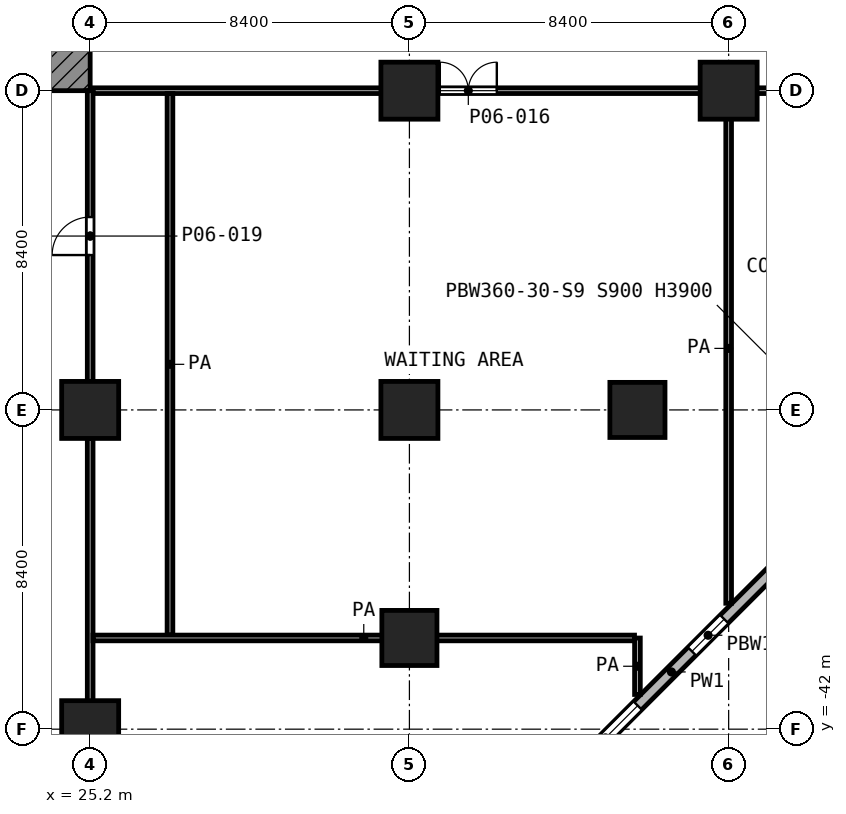
"""IFC4 building model, lengths in metres.
Left out: names, types, materials, properties, quantities, classifications, styles, units other than length and angle.
Written with IfcOpenShell. Run it as: python <this file> out.ifc"""

import sys

from ifc_helpers import new_model, si_unit, direction, frame, frame_2d, origin, origin_2d, place, context, subcontext, project, spatial, rectangle, extrude, element, fill, save


model = new_model("IFC4")
c1 = context("Model", 3, precision=1e-05, world=origin(), true_north=direction((0.0, 1.0)))
c2 = subcontext(c1, "Body", "Model", "MODEL_VIEW")
j1 = project(units=[si_unit("LENGTHUNIT", "METRE"), si_unit("PLANEANGLEUNIT", "RADIAN")], contexts=[c1])
p1 = place(None, origin())
s1 = spatial("IfcSite", under=j1, at=p1, CompositionType="ELEMENT")
p2 = place(p1, origin())
s2 = spatial("IfcBuilding", under=s1, at=p2, CompositionType="ELEMENT")
p3 = place(p2, frame((0.0, 0.0, 29.0)))
s3 = spatial("IfcBuildingStorey", under=s2, at=p3, CompositionType="ELEMENT", Elevation=29.0)
for number, where, z_axis, x_axis in (
    (1, (33.6, -25.2, 0.0), (0.0, 0.0, 1.0), (1.0, 0.0, 0.0)),
    (2, (42.0, -25.2, 0.0), (0.0, 0.0, 1.0), (1.0, 0.0, 0.0)),
    (3, (25.2, -33.6, 0.0), (0.0, 0.0, 1.0), (1.0, 0.0, 0.0)),
    (4, (33.6, -33.6, 0.0), (0.0, 0.0, 1.0), (1.0, 0.0, 0.0)),
):
    element("IfcColumn", number, at=place(p3, frame(where, z_axis=z_axis, x_axis=x_axis)), inside=s3, PredefinedType="COLUMN", context=c2, shape_type="SweptSolid", body=[
        extrude(rectangle(XDim=1.5, YDim=1.5, at=origin_2d()), origin(), (0.0, 0.0, 1.0), 5.2),
    ])
for number, where, z_axis, x_axis in (
    (5, (39.6, -33.6, 0.0), (0.0, 0.0, 1.0), (1.0, 0.0, 0.0)),
    (6, (33.6, -39.6, 0.0), (0.0, 0.0, 1.0), (1.0, 0.0, 0.0)),
):
    element("IfcColumn", number, at=place(p3, frame(where, z_axis=z_axis, x_axis=x_axis)), inside=s3, PredefinedType="COLUMN", context=c2, shape_type="SweptSolid", body=[
        extrude(rectangle(XDim=1.45, YDim=1.45, at=origin_2d()), origin(), (0.0, 0.0, 1.0), 5.2),
    ])
p4 = place(p3, frame((25.2, -42.0, 0.0), z_axis=(0.0, 0.0, 1.0), x_axis=(1.0, 0.0, 0.0)))
e7 = element("IfcColumn", 7, at=p4, inside=s3, PredefinedType="COLUMN", context=c2, shape_type="SweptSolid", body=[
    extrude(rectangle(XDim=1.5, YDim=1.5, at=origin_2d()), origin(), (0.0, 0.0, 1.0), 5.2),
])
p5 = place(p3, frame((37.45, -43.538, 0.0), z_axis=(0.0, 0.0, 1.0), x_axis=(0.707106781187, 0.707106781187, 0.0)))
e8 = element("IfcWall", 8, at=p5, inside=s3, PredefinedType="SOLIDWALL", context=c2, shape_type="SweptSolid", body=[
    extrude(rectangle(XDim=8.61, YDim=0.3, at=frame_2d((4.305, 0.0))), origin(), (0.0, 0.0, 1.0), 4.7),
])
p6 = place(p5, frame((0.651, 0.0, 0.9)))
e9 = element("IfcOpeningElement", 9, at=p6, cuts=e8, PredefinedType="OPENING", context=c2, shape_type="SweptSolid", body=[
    extrude(rectangle(XDim=2.4, YDim=3.0, at=frame_2d((1.2, 1.5))), frame((0.0, 0.16, 0.0), z_axis=(0.0, -1.0, 0.0), x_axis=(1.0, 0.0, 0.0)), (0.0, 0.0, 1.0), 0.32),
])
p7 = place(p5, frame((5.07, 0.0, 0.9)))
e10 = element("IfcOpeningElement", 10, at=p7, cuts=e8, PredefinedType="OPENING", context=c2, shape_type="SweptSolid", body=[
    extrude(rectangle(XDim=1.2, YDim=3.0, at=frame_2d((0.6, 1.5))), frame((0.0, 0.16, 0.0), z_axis=(0.0, -1.0, 0.0), x_axis=(1.0, 0.0, 0.0)), (0.0, 0.0, 1.0), 0.32),
])
p8 = place(p3, frame((24.6, -25.2, 0.0), z_axis=(0.0, 0.0, 1.0), x_axis=(0.0, 1.0, 0.0)))
e11 = element("IfcWall", 11, at=p8, inside=s3, PredefinedType="SHEAR", context=c2, shape_type="SweptSolid", body=[
    extrude(rectangle(XDim=1.2, YDim=1.2, at=frame_2d((0.6, 0.0))), origin(), (0.0, 0.0, 1.0), 4.7),
])
p9 = place(p3, frame((25.275, -39.6, 0.0), z_axis=(0.0, 0.0, 1.0), x_axis=(1.0, 0.0, 0.0)))
e12 = element("IfcWall", 12, at=p9, inside=s3, PredefinedType="PARTITIONING", context=c2, shape_type="SweptSolid", body=[
    extrude(rectangle(XDim=14.248, YDim=0.15, at=frame_2d((7.124, 0.0))), origin(), (0.0, 0.0, 1.0), 4.7),
])
p10 = place(p3, frame((25.275, -25.2, 0.0), z_axis=(0.0, 0.0, 1.0), x_axis=(1.0, 0.0, 0.0)))
e13 = element("IfcWall", 13, at=p10, inside=s3, PredefinedType="PARTITIONING", context=c2, shape_type="SweptSolid", body=[
    extrude(rectangle(XDim=70.805, YDim=0.15, at=frame_2d((35.403, 0.0))), origin(), (0.0, 0.0, 1.0), 4.7),
])
p11 = place(p10, frame((18.325, 0.0, 0.0)))
e14 = element("IfcOpeningElement", 14, at=p11, cuts=e13, PredefinedType="OPENING", context=c2, shape_type="SweptSolid", body=[
    extrude(rectangle(XDim=1.0, YDim=2.1, at=frame_2d((0.5, 1.05))), frame((0.0, 0.085, 0.0), z_axis=(0.0, -1.0, 0.0), x_axis=(1.0, 0.0, 0.0)), (0.0, 0.0, 1.0), 0.17),
])
p12 = place(p10, frame((22.525, 0.0, 0.0)))
e15 = element("IfcOpeningElement", 15, at=p12, cuts=e13, PredefinedType="OPENING", context=c2, shape_type="SweptSolid", body=[
    extrude(rectangle(XDim=1.0, YDim=2.1, at=frame_2d((0.5, 1.05))), frame((0.0, 0.085, 0.0), z_axis=(0.0, -1.0, 0.0), x_axis=(1.0, 0.0, 0.0)), (0.0, 0.0, 1.0), 0.17),
])
p13 = place(p10, frame((27.025, 0.0, 0.0)))
e16 = element("IfcOpeningElement", 16, at=p13, cuts=e13, PredefinedType="OPENING", context=c2, shape_type="SweptSolid", body=[
    extrude(rectangle(XDim=1.0, YDim=2.1, at=frame_2d((0.5, 1.05))), frame((0.0, 0.085, 0.0), z_axis=(0.0, -1.0, 0.0), x_axis=(1.0, 0.0, 0.0)), (0.0, 0.0, 1.0), 0.17),
])
p14 = place(p10, frame((31.225, 0.0, 0.0)))
e17 = element("IfcOpeningElement", 17, at=p14, cuts=e13, PredefinedType="OPENING", context=c2, shape_type="SweptSolid", body=[
    extrude(rectangle(XDim=1.0, YDim=2.1, at=frame_2d((0.5, 1.05))), frame((0.0, 0.085, 0.0), z_axis=(0.0, -1.0, 0.0), x_axis=(1.0, 0.0, 0.0)), (0.0, 0.0, 1.0), 0.17),
])
p15 = place(p10, frame((34.975, 0.0, 0.0)))
e18 = element("IfcOpeningElement", 18, at=p15, cuts=e13, PredefinedType="OPENING", context=c2, shape_type="SweptSolid", body=[
    extrude(rectangle(XDim=1.0, YDim=2.1, at=frame_2d((0.5, 1.05))), frame((0.0, 0.085, 0.0), z_axis=(0.0, -1.0, 0.0), x_axis=(1.0, 0.0, 0.0)), (0.0, 0.0, 1.0), 0.17),
])
p16 = place(p10, frame((39.175, 0.0, 0.0)))
e19 = element("IfcOpeningElement", 19, at=p16, cuts=e13, PredefinedType="OPENING", context=c2, shape_type="SweptSolid", body=[
    extrude(rectangle(XDim=1.0, YDim=2.1, at=frame_2d((0.5, 1.05))), frame((0.0, 0.085, 0.0), z_axis=(0.0, -1.0, 0.0), x_axis=(1.0, 0.0, 0.0)), (0.0, 0.0, 1.0), 0.17),
])
p17 = place(p10, frame((43.675, 0.0, 0.0)))
e20 = element("IfcOpeningElement", 20, at=p17, cuts=e13, PredefinedType="OPENING", context=c2, shape_type="SweptSolid", body=[
    extrude(rectangle(XDim=1.0, YDim=2.1, at=frame_2d((0.5, 1.05))), frame((0.0, 0.085, 0.0), z_axis=(0.0, -1.0, 0.0), x_axis=(1.0, 0.0, 0.0)), (0.0, 0.0, 1.0), 0.17),
])
p18 = place(p10, frame((47.875, 0.0, 0.0)))
e21 = element("IfcOpeningElement", 21, at=p18, cuts=e13, PredefinedType="OPENING", context=c2, shape_type="SweptSolid", body=[
    extrude(rectangle(XDim=1.0, YDim=2.1, at=frame_2d((0.5, 1.05))), frame((0.0, 0.085, 0.0), z_axis=(0.0, -1.0, 0.0), x_axis=(1.0, 0.0, 0.0)), (0.0, 0.0, 1.0), 0.17),
])
p19 = place(p10, frame((51.625, 0.0, 0.0)))
e22 = element("IfcOpeningElement", 22, at=p19, cuts=e13, PredefinedType="OPENING", context=c2, shape_type="SweptSolid", body=[
    extrude(rectangle(XDim=1.0, YDim=2.1, at=frame_2d((0.5, 1.05))), frame((0.0, 0.085, 0.0), z_axis=(0.0, -1.0, 0.0), x_axis=(1.0, 0.0, 0.0)), (0.0, 0.0, 1.0), 0.17),
])
p20 = place(p10, frame((55.825, 0.0, 0.0)))
e23 = element("IfcOpeningElement", 23, at=p20, cuts=e13, PredefinedType="OPENING", context=c2, shape_type="SweptSolid", body=[
    extrude(rectangle(XDim=1.0, YDim=2.1, at=frame_2d((0.5, 1.05))), frame((0.0, 0.085, 0.0), z_axis=(0.0, -1.0, 0.0), x_axis=(1.0, 0.0, 0.0)), (0.0, 0.0, 1.0), 0.17),
])
p21 = place(p10, frame((60.325, 0.0, 0.0)))
e24 = element("IfcOpeningElement", 24, at=p21, cuts=e13, PredefinedType="OPENING", context=c2, shape_type="SweptSolid", body=[
    extrude(rectangle(XDim=1.0, YDim=2.1, at=frame_2d((0.5, 1.05))), frame((0.0, 0.085, 0.0), z_axis=(0.0, -1.0, 0.0), x_axis=(1.0, 0.0, 0.0)), (0.0, 0.0, 1.0), 0.17),
])
p22 = place(p10, frame((66.525, 0.0, 0.0)))
e25 = element("IfcOpeningElement", 25, at=p22, cuts=e13, PredefinedType="OPENING", context=c2, shape_type="SweptSolid", body=[
    extrude(rectangle(XDim=1.0, YDim=2.1, at=frame_2d((0.5, 1.05))), frame((0.0, 0.085, 0.0), z_axis=(0.0, -1.0, 0.0), x_axis=(1.0, 0.0, 0.0)), (0.0, 0.0, 1.0), 0.17),
])
p23 = place(p10, frame((9.125, 0.0, 0.0)))
e26 = element("IfcOpeningElement", 26, at=p23, cuts=e13, PredefinedType="OPENING", context=c2, shape_type="SweptSolid", body=[
    extrude(rectangle(XDim=1.5, YDim=2.1, at=frame_2d((0.75, 1.05))), frame((0.0, 0.085, 0.0), z_axis=(0.0, -1.0, 0.0), x_axis=(1.0, 0.0, 0.0)), (0.0, 0.0, 1.0), 0.17),
])
p24 = place(p3, frame((25.2, -81.3, 0.0), z_axis=(0.0, 0.0, 1.0), x_axis=(0.0, 1.0, 0.0)))
e27 = element("IfcWall", 27, at=p24, inside=s3, PredefinedType="PARTITIONING", context=c2, shape_type="SweptSolid", body=[
    extrude(rectangle(XDim=46.95, YDim=0.15, at=frame_2d((23.475, 0.0))), origin(), (0.0, 0.0, 1.0), 4.7),
])
p25 = place(p24, frame((35.55, 0.0, 0.0)))
e28 = element("IfcOpeningElement", 28, at=p25, cuts=e27, PredefinedType="OPENING", context=c2, shape_type="SweptSolid", body=[
    extrude(rectangle(XDim=1.5, YDim=2.1, at=frame_2d((0.75, 1.05))), frame((0.0, 0.085, 0.0), z_axis=(0.0, -1.0, 0.0), x_axis=(1.0, 0.0, 0.0)), (0.0, 0.0, 1.0), 0.17),
])
p26 = place(p24, frame((28.0, 0.0, 0.0)))
e29 = element("IfcOpeningElement", 29, at=p26, cuts=e27, PredefinedType="OPENING", context=c2, shape_type="SweptSolid", body=[
    extrude(rectangle(XDim=1.0, YDim=2.1, at=frame_2d((0.5, 1.05))), frame((0.0, 0.085, 0.0), z_axis=(0.0, -1.0, 0.0), x_axis=(1.0, 0.0, 0.0)), (0.0, 0.0, 1.0), 0.17),
])
p27 = place(p24, frame((23.8, 0.0, 0.0)))
e30 = element("IfcOpeningElement", 30, at=p27, cuts=e27, PredefinedType="OPENING", context=c2, shape_type="SweptSolid", body=[
    extrude(rectangle(XDim=1.0, YDim=2.1, at=frame_2d((0.5, 1.05))), frame((0.0, 0.085, 0.0), z_axis=(0.0, -1.0, 0.0), x_axis=(1.0, 0.0, 0.0)), (0.0, 0.0, 1.0), 0.17),
])
p28 = place(p24, frame((20.05, 0.0, 0.0)))
e31 = element("IfcOpeningElement", 31, at=p28, cuts=e27, PredefinedType="OPENING", context=c2, shape_type="SweptSolid", body=[
    extrude(rectangle(XDim=1.0, YDim=2.1, at=frame_2d((0.5, 1.05))), frame((0.0, 0.085, 0.0), z_axis=(0.0, -1.0, 0.0), x_axis=(1.0, 0.0, 0.0)), (0.0, 0.0, 1.0), 0.17),
])
p29 = place(p24, frame((15.85, 0.0, 0.0)))
e32 = element("IfcOpeningElement", 32, at=p29, cuts=e27, PredefinedType="OPENING", context=c2, shape_type="SweptSolid", body=[
    extrude(rectangle(XDim=1.0, YDim=2.1, at=frame_2d((0.5, 1.05))), frame((0.0, 0.085, 0.0), z_axis=(0.0, -1.0, 0.0), x_axis=(1.0, 0.0, 0.0)), (0.0, 0.0, 1.0), 0.17),
])
p30 = place(p24, frame((11.35, 0.0, 0.0)))
e33 = element("IfcOpeningElement", 33, at=p30, cuts=e27, PredefinedType="OPENING", context=c2, shape_type="SweptSolid", body=[
    extrude(rectangle(XDim=1.0, YDim=2.1, at=frame_2d((0.5, 1.05))), frame((0.0, 0.085, 0.0), z_axis=(0.0, -1.0, 0.0), x_axis=(1.0, 0.0, 0.0)), (0.0, 0.0, 1.0), 0.17),
])
p31 = place(p24, frame((7.15, 0.0, 0.0)))
e34 = element("IfcOpeningElement", 34, at=p31, cuts=e27, PredefinedType="OPENING", context=c2, shape_type="SweptSolid", body=[
    extrude(rectangle(XDim=1.0, YDim=2.1, at=frame_2d((0.5, 1.05))), frame((0.0, 0.085, 0.0), z_axis=(0.0, -1.0, 0.0), x_axis=(1.0, 0.0, 0.0)), (0.0, 0.0, 1.0), 0.17),
])
p32 = place(p24, frame((3.4, 0.0, 0.0)))
e35 = element("IfcOpeningElement", 35, at=p32, cuts=e27, PredefinedType="OPENING", context=c2, shape_type="SweptSolid", body=[
    extrude(rectangle(XDim=1.0, YDim=2.1, at=frame_2d((0.5, 1.05))), frame((0.0, 0.085, 0.0), z_axis=(0.0, -1.0, 0.0), x_axis=(1.0, 0.0, 0.0)), (0.0, 0.0, 1.0), 0.17),
])
p33 = place(p3, frame((25.2, -32.85, 0.0), z_axis=(0.0, 0.0, 1.0), x_axis=(0.0, 1.0, 0.0)))
e36 = element("IfcWall", 36, at=p33, inside=s3, PredefinedType="PARTITIONING", context=c2, shape_type="SweptSolid", body=[
    extrude(rectangle(XDim=7.65, YDim=0.15, at=frame_2d((3.825, 0.0))), origin(), (0.0, 0.0, 1.0), 4.7),
])
p34 = place(p33, frame((3.325, 0.0, 0.0)))
e37 = element("IfcOpeningElement", 37, at=p34, cuts=e36, PredefinedType="OPENING", context=c2, shape_type="SweptSolid", body=[
    extrude(rectangle(XDim=1.0, YDim=2.1, at=frame_2d((0.5, 1.05))), frame((0.0, 0.085, 0.0), z_axis=(0.0, -1.0, 0.0), x_axis=(1.0, 0.0, 0.0)), (0.0, 0.0, 1.0), 0.17),
])
p35 = place(p3, frame((27.3, -39.525, 0.0), z_axis=(0.0, 0.0, 1.0), x_axis=(0.0, 1.0, 0.0)))
e38 = element("IfcWall", 38, at=p35, inside=s3, PredefinedType="PARTITIONING", context=c2, shape_type="SweptSolid", body=[
    extrude(rectangle(XDim=14.25, YDim=0.15, at=frame_2d((7.125, 0.0))), origin(), (0.0, 0.0, 1.0), 4.7),
])
p36 = place(p3, frame((39.6, -41.087, 0.0), z_axis=(0.0, 0.0, 1.0), x_axis=(0.0, 1.0, 0.0)))
e39 = element("IfcWall", 39, at=p36, inside=s3, PredefinedType="PARTITIONING", context=c2, shape_type="SweptSolid", body=[
    extrude(rectangle(XDim=1.485, YDim=0.15, at=frame_2d((0.742, 0.0))), origin(), (0.0, 0.0, 1.0), 4.7),
])
p37 = place(p3, frame((42.0, -38.687, 0.0), z_axis=(0.0, 0.0, 1.0), x_axis=(0.0, 1.0, 0.0)))
e40 = element("IfcWall", 40, at=p37, inside=s3, PredefinedType="PARTITIONING", context=c2, shape_type="SweptSolid", body=[
    extrude(rectangle(XDim=13.412, YDim=0.15, at=frame_2d((6.706, 0.0))), origin(), (0.0, 0.0, 1.0), 4.7),
])
p38 = place(p6, origin())
e41 = element("IfcWindow", 41, at=p38, inside=s3, PartitioningType="SINGLE_PANEL", PredefinedType="WINDOW", context=c2, shape_type="SweptSolid", body=[
    extrude(rectangle(XDim=2.4, YDim=3.0, at=frame_2d((1.2, 1.5))), frame((0.0, 0.03, 0.0), z_axis=(0.0, -1.0, 0.0), x_axis=(1.0, 0.0, 0.0)), (0.0, 0.0, 1.0), 0.06),
])
fill(e9, e41)
p39 = place(p7, origin())
e42 = element("IfcWindow", 42, at=p39, inside=s3, PartitioningType="SINGLE_PANEL", PredefinedType="WINDOW", context=c2, shape_type="SweptSolid", body=[
    extrude(rectangle(XDim=1.2, YDim=3.0, at=frame_2d((0.6, 1.5))), frame((0.0, 0.03, 0.0), z_axis=(0.0, -1.0, 0.0), x_axis=(1.0, 0.0, 0.0)), (0.0, 0.0, 1.0), 0.06),
])
fill(e10, e42)
p40 = place(p34, origin())
e43 = element("IfcDoor", 43, at=p40, inside=s3, OperationType="SINGLE_SWING_LEFT", PredefinedType="DOOR", context=c2, shape_type="SweptSolid", body=[
    extrude(rectangle(XDim=1.0, YDim=2.1, at=frame_2d((0.5, 1.05))), frame((0.0, 0.025, 0.0), z_axis=(0.0, -1.0, 0.0), x_axis=(1.0, 0.0, 0.0)), (0.0, 0.0, 1.0), 0.05),
])
fill(e37, e43)
p41 = place(p23, origin())
e44 = element("IfcDoor", 44, at=p41, inside=s3, OperationType="DOUBLE_DOOR_SINGLE_SWING", PredefinedType="DOOR", context=c2, shape_type="SweptSolid", body=[
    extrude(rectangle(XDim=1.5, YDim=2.1, at=frame_2d((0.75, 1.05))), frame((0.0, 0.025, 0.0), z_axis=(0.0, -1.0, 0.0), x_axis=(1.0, 0.0, 0.0)), (0.0, 0.0, 1.0), 0.05),
])
fill(e26, e44)
save(model, sys.argv[1])
